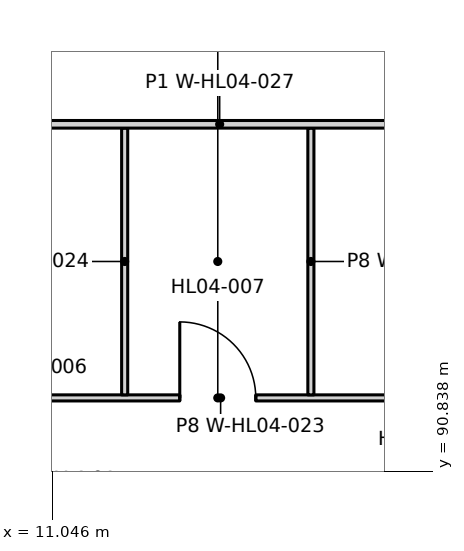
"""IFC4 building model, lengths in metres.
Left out: names, types, materials, properties, quantities, classifications, styles, units other than length and angle.
Written with IfcOpenShell. Run it as: python <this file> out.ifc"""

import sys

from ifc_helpers import new_model, si_unit, direction, frame, frame_2d, origin, place, context, subcontext, project, spatial, rectangle, extrude, element, fill, save


model = new_model("IFC4")
c1 = context("Model", 3, precision=1e-05, world=origin(), true_north=direction((0.0, 1.0)))
c2 = subcontext(c1, "Body", "Model", "MODEL_VIEW")
j1 = project(units=[si_unit("LENGTHUNIT", "METRE"), si_unit("PLANEANGLEUNIT", "RADIAN")], contexts=[c1])
p1 = place(None, origin())
s1 = spatial("IfcSite", under=j1, at=p1, CompositionType="ELEMENT")
p2 = place(p1, origin())
s2 = spatial("IfcBuilding", under=s1, at=p2, CompositionType="ELEMENT")
p3 = place(p2, frame((0.0, 0.0, 19.5)))
s3 = spatial("IfcBuildingStorey", under=s2, at=p3, CompositionType="ELEMENT", Elevation=19.5)
p4 = place(p3, frame((9.05, 91.8, 0.0), z_axis=(0.0, 0.0, 1.0), x_axis=(1.0, 0.0, 0.0)))
e1 = element("IfcWall", 1, at=p4, inside=s3, PredefinedType="PARTITIONING", context=c2, shape_type="SweptSolid", body=[
    extrude(rectangle(XDim=8.425, YDim=0.08, at=frame_2d((4.212, 0.0))), origin(), (0.0, 0.0, 1.0), 4.2),
])
p5 = place(p4, frame((0.95, 0.0, 0.0)))
e2 = element("IfcOpeningElement", 2, at=p5, cuts=e1, PredefinedType="OPENING", context=c2, shape_type="SweptSolid", body=[
    extrude(rectangle(XDim=1.0, YDim=2.1, at=frame_2d((0.5, 1.05))), frame((0.0, 0.05, 0.0), z_axis=(0.0, -1.0, 0.0), x_axis=(1.0, 0.0, 0.0)), (0.0, 0.0, 1.0), 0.1),
])
p6 = place(p4, frame((3.675, 0.0, 0.0)))
e3 = element("IfcOpeningElement", 3, at=p6, cuts=e1, PredefinedType="OPENING", context=c2, shape_type="SweptSolid", body=[
    extrude(rectangle(XDim=1.0, YDim=2.1, at=frame_2d((0.5, 1.05))), frame((0.0, 0.05, 0.0), z_axis=(0.0, -1.0, 0.0), x_axis=(1.0, 0.0, 0.0)), (0.0, 0.0, 1.0), 0.1),
])
p7 = place(p4, frame((6.4, 0.0, 0.0)))
e4 = element("IfcOpeningElement", 4, at=p7, cuts=e1, PredefinedType="OPENING", context=c2, shape_type="SweptSolid", body=[
    extrude(rectangle(XDim=1.0, YDim=2.1, at=frame_2d((0.5, 1.05))), frame((0.0, 0.05, 0.0), z_axis=(0.0, -1.0, 0.0), x_axis=(1.0, 0.0, 0.0)), (0.0, 0.0, 1.0), 0.1),
])
for number, where, z_axis, x_axis in (
    (5, (12.0, 91.84, 0.0), (0.0, 0.0, 1.0), (0.0, 1.0, 0.0)),
    (6, (14.45, 91.84, 0.0), (0.0, 0.0, 1.0), (0.0, 1.0, 0.0)),
):
    element("IfcWall", number, at=place(p3, frame(where, z_axis=z_axis, x_axis=x_axis)), inside=s3, PredefinedType="PARTITIONING", context=c2, shape_type="SweptSolid", body=[
        extrude(rectangle(XDim=3.51, YDim=0.08, at=frame_2d((1.755, 0.0))), origin(), (0.0, 0.0, 1.0), 4.2),
    ])
p8 = place(p3, frame((8.95, 95.4, 0.0), z_axis=(0.0, 0.0, 1.0), x_axis=(1.0, 0.0, 0.0)))
e7 = element("IfcWall", 7, at=p8, inside=s3, PredefinedType="PARTITIONING", context=c2, shape_type="SweptSolid", body=[
    extrude(rectangle(XDim=8.6, YDim=0.1, at=frame_2d((4.3, 0.0))), origin(), (0.0, 0.0, 1.0), 4.2),
])
p9 = place(p6, origin())
e8 = element("IfcDoor", 8, at=p9, inside=s3, OperationType="SINGLE_SWING_LEFT", PredefinedType="DOOR", context=c2, shape_type="SweptSolid", body=[
    extrude(rectangle(XDim=1.0, YDim=2.1, at=frame_2d((0.5, 1.05))), frame((0.0, 0.025, 0.0), z_axis=(0.0, -1.0, 0.0), x_axis=(1.0, 0.0, 0.0)), (0.0, 0.0, 1.0), 0.05),
])
fill(e3, e8)
save(model, sys.argv[1])
